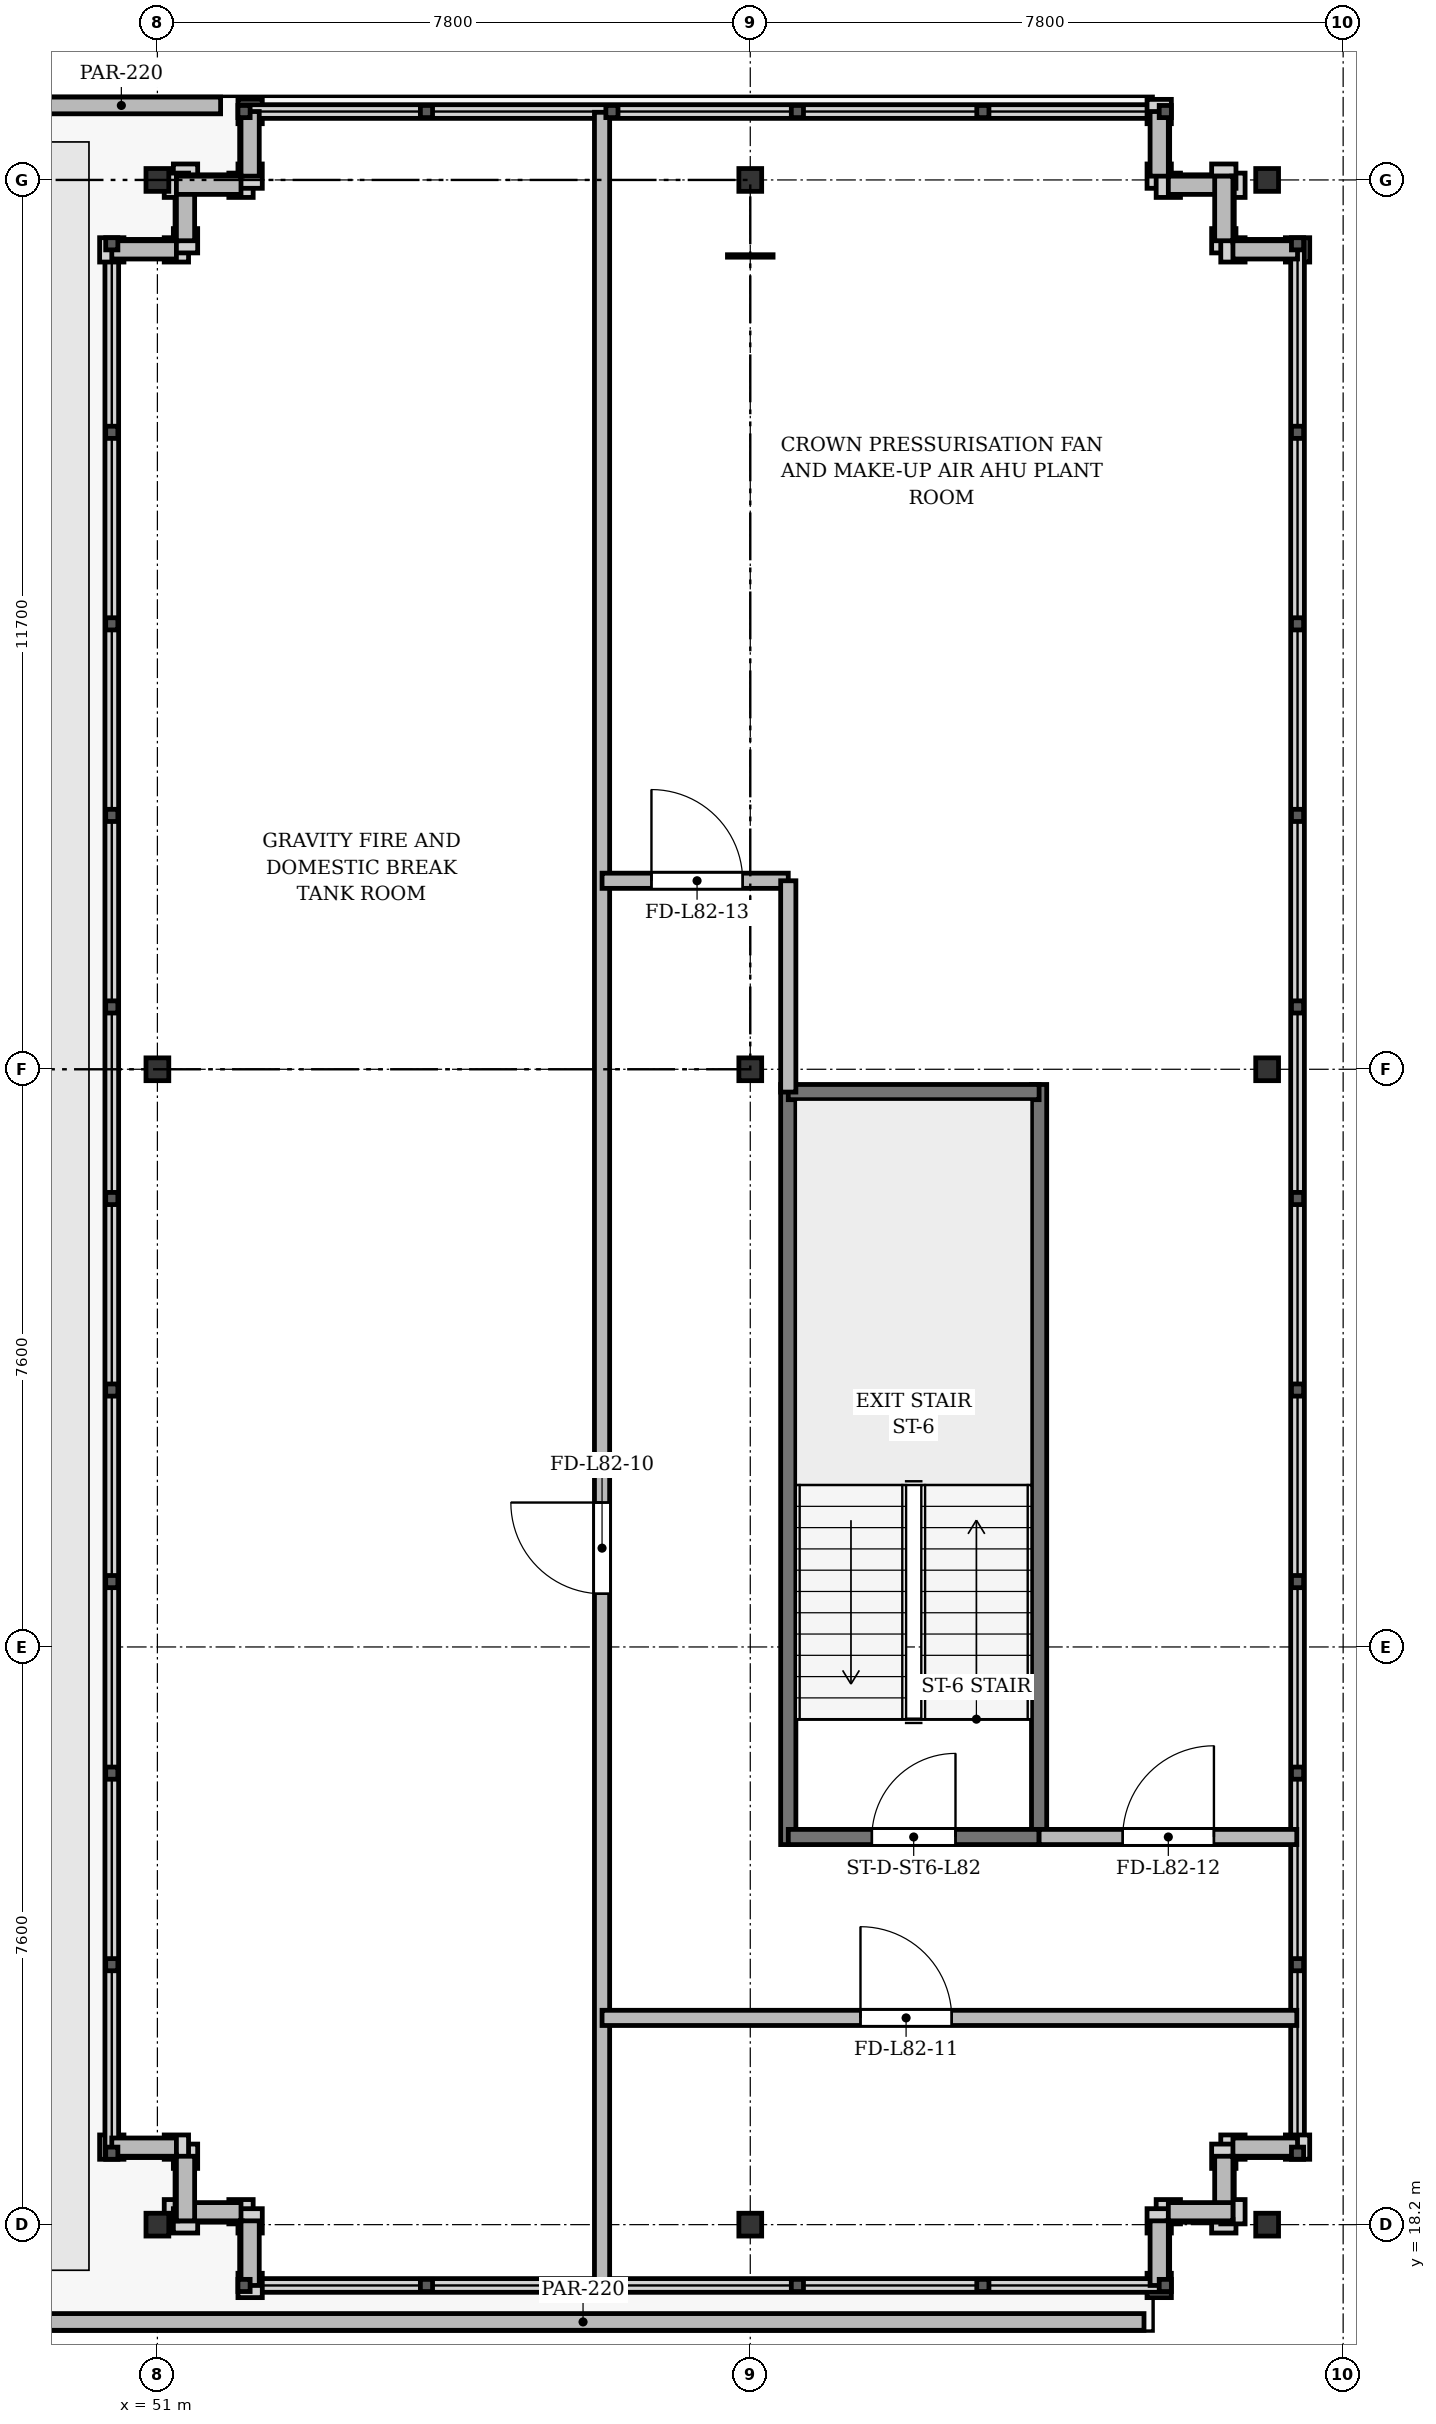
"""IFC4 building model, lengths in metres.
Left out: names, types, materials, properties, quantities, classifications, styles, units other than length and angle.
Written with IfcOpenShell. Run it as: python <this file> out.ifc"""

import sys

from ifc_helpers import new_model, si_unit, direction, frame, frame_2d, origin, origin_2d, place, context, subcontext, project, spatial, rectangle, i_section, extrude, source, transform, mapped, element, fill, save


model = new_model("IFC4")
c1 = context("Model", 3, precision=1e-05, world=origin(), true_north=direction((0.0, 1.0)))
c2 = subcontext(c1, "Body", "Model", "MODEL_VIEW")
j1 = project(units=[si_unit("LENGTHUNIT", "METRE"), si_unit("PLANEANGLEUNIT", "RADIAN")], contexts=[c1])
p1 = place(None, origin())
s1 = spatial("IfcSite", under=j1, at=p1, CompositionType="ELEMENT")
p2 = place(p1, origin())
s2 = spatial("IfcBuilding", under=s1, at=p2, CompositionType="ELEMENT")
p3 = place(p2, frame((0.0, 0.0, 316.7)))
s3 = spatial("IfcBuildingStorey", under=s2, at=p3, CompositionType="ELEMENT", Elevation=316.7)
m1 = source(origin(), c2, "Body", "SweptSolid", [
    extrude(i_section(OverallWidth=0.3, OverallDepth=0.3, WebThickness=0.015, FlangeThickness=0.024, at=origin_2d()), origin(), (0.0, 0.0, 1.0), 4.2),
])
for number, where, z_axis, x_axis in (
    (1, (51.0, 18.2, 0.0), (0.0, 0.0, 1.0), (1.0, 0.0, 0.0)),
    (2, (51.0, 33.4, 0.0), (0.0, 0.0, 1.0), (1.0, 0.0, 0.0)),
    (3, (51.0, 45.1, 0.0), (0.0, 0.0, 1.0), (1.0, 0.0, 0.0)),
    (4, (58.8, 18.2, 0.0), (0.0, 0.0, 1.0), (1.0, 0.0, 0.0)),
    (5, (58.8, 33.4, 0.0), (0.0, 0.0, 1.0), (1.0, 0.0, 0.0)),
    (6, (58.8, 45.1, 0.0), (0.0, 0.0, 1.0), (1.0, 0.0, 0.0)),
    (7, (65.6, 18.2, 0.0), (0.0, 0.0, 1.0), (1.0, 0.0, 0.0)),
    (8, (65.6, 33.4, 0.0), (0.0, 0.0, 1.0), (1.0, 0.0, 0.0)),
    (9, (65.6, 45.1, 0.0), (0.0, 0.0, 1.0), (1.0, 0.0, 0.0)),
):
    element("IfcColumn", number, at=place(p3, frame(where, z_axis=z_axis, x_axis=x_axis)), inside=s3, PredefinedType="COLUMN", context=c2, shape_type="MappedRepresentation", body=[
        mapped(m1, transform((0.0, 0.0, 0.0), x_axis=(1.0, 0.0, 0.0), y_axis=(0.0, 1.0, 0.0), z_axis=(0.0, 0.0, 1.0), scale=1.0)),
    ])
for number, where, z_axis, x_axis in (
    (10, (52.1, 18.37, 0.0), (0.0, 0.0, 1.0), (-1.0, 0.0, 0.0)),
    (11, (51.37, 18.25, 0.0), (0.0, 0.0, 1.0), (0.0, 1.0, 0.0)),
    (12, (51.25, 19.22, 0.0), (0.0, 0.0, 1.0), (-1.0, 0.0, 0.0)),
    (13, (50.4, 44.18, 0.0), (0.0, 0.0, 1.0), (1.0, 0.0, 0.0)),
):
    element("IfcWall", number, at=place(p3, frame(where, z_axis=z_axis, x_axis=x_axis)), inside=s3, PredefinedType="SOLIDWALL", context=c2, shape_type="SweptSolid", body=[
        extrude(rectangle(XDim=0.85, YDim=0.24, at=frame_2d((0.425, 0.0))), origin(), (0.0, 0.0, 1.0), 3.41),
    ])
p4 = place(p3, frame((51.37, 44.3, 0.0), z_axis=(0.0, 0.0, 1.0), x_axis=(0.0, 1.0, 0.0)))
e14 = element("IfcWall", 14, at=p4, inside=s3, PredefinedType="SOLIDWALL", context=c2, shape_type="SweptSolid", body=[
    extrude(rectangle(XDim=0.85, YDim=0.24, at=frame_2d((0.425, 0.0))), origin(), (0.0, 0.0, 1.0), 3.41),
])
for number, where, z_axis, x_axis in (
    (15, (51.25, 45.03, 0.0), (0.0, 0.0, 1.0), (1.0, 0.0, 0.0)),
    (16, (52.22, 45.15, 0.0), (0.0, 0.0, 1.0), (0.0, 1.0, 0.0)),
    (17, (64.18, 46.0, 0.0), (0.0, 0.0, 1.0), (0.0, -1.0, 0.0)),
):
    element("IfcWall", number, at=place(p3, frame(where, z_axis=z_axis, x_axis=x_axis)), inside=s3, PredefinedType="SOLIDWALL", context=c2, shape_type="SweptSolid", body=[
        extrude(rectangle(XDim=0.85, YDim=0.24, at=frame_2d((0.425, 0.0))), origin(), (0.0, 0.0, 1.0), 3.41),
    ])
for number, where, z_axis, x_axis in (
    (18, (64.3, 45.03, 0.0), (0.0, 0.0, 1.0), (1.0, 0.0, 0.0)),
    (19, (65.03, 45.15, 0.0), (0.0, 0.0, 1.0), (0.0, -1.0, 0.0)),
):
    element("IfcWall", number, at=place(p3, frame(where, z_axis=z_axis, x_axis=x_axis)), inside=s3, PredefinedType="SOLIDWALL", context=c2, shape_type="SweptSolid", body=[
        extrude(rectangle(XDim=0.85, YDim=0.24, at=frame_2d((0.425, 0.0))), origin(), (0.0, 0.0, 1.0), 3.41),
    ])
for number, where, z_axis, x_axis in (
    (20, (65.15, 44.18, 0.0), (0.0, 0.0, 1.0), (1.0, 0.0, 0.0)),
    (21, (66.0, 19.22, 0.0), (0.0, 0.0, 1.0), (-1.0, 0.0, 0.0)),
    (22, (65.03, 19.1, 0.0), (0.0, 0.0, 1.0), (0.0, -1.0, 0.0)),
):
    element("IfcWall", number, at=place(p3, frame(where, z_axis=z_axis, x_axis=x_axis)), inside=s3, PredefinedType="SOLIDWALL", context=c2, shape_type="SweptSolid", body=[
        extrude(rectangle(XDim=0.85, YDim=0.24, at=frame_2d((0.425, 0.0))), origin(), (0.0, 0.0, 1.0), 3.41),
    ])
p5 = place(p3, frame((65.15, 18.37, 0.0), z_axis=(0.0, 0.0, 1.0), x_axis=(-1.0, 0.0, 0.0)))
e23 = element("IfcWall", 23, at=p5, inside=s3, PredefinedType="SOLIDWALL", context=c2, shape_type="SweptSolid", body=[
    extrude(rectangle(XDim=0.85, YDim=0.24, at=frame_2d((0.425, 0.0))), origin(), (0.0, 0.0, 1.0), 3.41),
])
for number, where, z_axis, x_axis in (
    (24, (64.18, 18.25, 0.0), (0.0, 0.0, 1.0), (0.0, -1.0, 0.0)),
    (25, (52.22, 17.4, 0.0), (0.0, 0.0, 1.0), (0.0, 1.0, 0.0)),
):
    element("IfcWall", number, at=place(p3, frame(where, z_axis=z_axis, x_axis=x_axis)), inside=s3, PredefinedType="SOLIDWALL", context=c2, shape_type="SweptSolid", body=[
        extrude(rectangle(XDim=0.85, YDim=0.24, at=frame_2d((0.425, 0.0))), origin(), (0.0, 0.0, 1.0), 3.41),
    ])
p6 = place(p3, frame((49.22, 46.08, 0.0), z_axis=(0.0, 0.0, 1.0), x_axis=(1.0, 0.0, 0.0)))
e26 = element("IfcWall", 26, at=p6, inside=s3, PredefinedType="PARAPET", context=c2, shape_type="SweptSolid", body=[
    extrude(rectangle(XDim=2.612, YDim=0.22, at=frame_2d((1.306, 0.0))), origin(), (0.0, 0.0, 1.0), 1.08),
])
p7 = place(p3, frame((63.98, 16.92, 0.0), z_axis=(0.0, 0.0, 1.0), x_axis=(-1.0, 0.0, 0.0)))
e27 = element("IfcWall", 27, at=p7, inside=s3, PredefinedType="PARAPET", context=c2, shape_type="SweptSolid", body=[
    extrude(rectangle(XDim=14.76, YDim=0.22, at=frame_2d((7.38, 0.0))), origin(), (0.0, 0.0, 1.0), 1.08),
])
for number, where, z_axis, x_axis in (
    (28, (59.3, 23.2, 0.0), (0.0, 0.0, 1.0), (0.0, 1.0, 0.0)),
    (29, (62.6, 23.2, 0.0), (0.0, 0.0, 1.0), (0.0, 1.0, 0.0)),
):
    element("IfcWall", number, at=place(p3, frame(where, z_axis=z_axis, x_axis=x_axis)), inside=s3, PredefinedType="SHEAR", context=c2, shape_type="SweptSolid", body=[
        extrude(rectangle(XDim=10.0, YDim=0.2, at=frame_2d((5.0, 0.0))), origin(), (0.0, 0.0, 1.0), 3.91),
    ])
p8 = place(p3, frame((59.3, 33.1, 0.0), z_axis=(0.0, 0.0, 1.0), x_axis=(1.0, 0.0, 0.0)))
e30 = element("IfcWall", 30, at=p8, inside=s3, PredefinedType="SHEAR", context=c2, shape_type="SweptSolid", body=[
    extrude(rectangle(XDim=3.3, YDim=0.2, at=frame_2d((1.65, 0.0))), origin(), (0.0, 0.0, 1.0), 3.91),
])
p9 = place(p3, frame((59.3, 23.3, 0.0), z_axis=(0.0, 0.0, 1.0), x_axis=(1.0, 0.0, 0.0)))
e31 = element("IfcWall", 31, at=p9, inside=s3, PredefinedType="SHEAR", context=c2, shape_type="SweptSolid", body=[
    extrude(rectangle(XDim=3.3, YDim=0.2, at=frame_2d((1.65, 0.0))), origin(), (0.0, 0.0, 1.0), 3.91),
])
p10 = place(p9, frame((1.1, 0.0, 0.0)))
e32 = element("IfcOpeningElement", 32, at=p10, cuts=e31, PredefinedType="OPENING", context=c2, shape_type="SweptSolid", body=[
    extrude(rectangle(XDim=1.1, YDim=2.15, at=frame_2d((0.55, 1.075))), frame((0.0, 0.11, 0.0), z_axis=(0.0, -1.0, 0.0), x_axis=(1.0, 0.0, 0.0)), (0.0, 0.0, 1.0), 0.22),
])
p11 = place(p3, frame((56.85, 17.41, 0.0), z_axis=(0.0, 0.0, 1.0), x_axis=(0.0, 1.0, 0.0)))
e33 = element("IfcWall", 33, at=p11, inside=s3, PredefinedType="PARTITIONING", context=c2, shape_type="SweptSolid", body=[
    extrude(rectangle(XDim=28.58, YDim=0.2, at=frame_2d((14.29, 0.0))), origin(), (0.0, 0.0, 1.0), 3.41),
])
p12 = place(p11, frame((9.09, 0.0, 0.0)))
e34 = element("IfcOpeningElement", 34, at=p12, cuts=e33, PredefinedType="OPENING", context=c2, shape_type="SweptSolid", body=[
    extrude(rectangle(XDim=1.2, YDim=2.15, at=frame_2d((0.6, 1.075))), frame((0.0, 0.11, 0.0), z_axis=(0.0, -1.0, 0.0), x_axis=(1.0, 0.0, 0.0)), (0.0, 0.0, 1.0), 0.22),
])
p13 = place(p3, frame((56.85, 20.92, 0.0), z_axis=(0.0, 0.0, 1.0), x_axis=(1.0, 0.0, 0.0)))
e35 = element("IfcWall", 35, at=p13, inside=s3, PredefinedType="PARTITIONING", context=c2, shape_type="SweptSolid", body=[
    extrude(rectangle(XDim=9.14, YDim=0.2, at=frame_2d((4.57, 0.0))), origin(), (0.0, 0.0, 1.0), 3.41),
])
p14 = place(p13, frame((3.4, 0.0, 0.0)))
e36 = element("IfcOpeningElement", 36, at=p14, cuts=e35, PredefinedType="OPENING", context=c2, shape_type="SweptSolid", body=[
    extrude(rectangle(XDim=1.2, YDim=2.15, at=frame_2d((0.6, 1.075))), frame((0.0, 0.11, 0.0), z_axis=(0.0, -1.0, 0.0), x_axis=(1.0, 0.0, 0.0)), (0.0, 0.0, 1.0), 0.22),
])
p15 = place(p3, frame((62.6, 23.3, 0.0), z_axis=(0.0, 0.0, 1.0), x_axis=(1.0, 0.0, 0.0)))
e37 = element("IfcWall", 37, at=p15, inside=s3, PredefinedType="PARTITIONING", context=c2, shape_type="SweptSolid", body=[
    extrude(rectangle(XDim=3.39, YDim=0.2, at=frame_2d((1.695, 0.0))), origin(), (0.0, 0.0, 1.0), 3.41),
])
p16 = place(p15, frame((1.1, 0.0, 0.0)))
e38 = element("IfcOpeningElement", 38, at=p16, cuts=e37, PredefinedType="OPENING", context=c2, shape_type="SweptSolid", body=[
    extrude(rectangle(XDim=1.2, YDim=2.15, at=frame_2d((0.6, 1.075))), frame((0.0, 0.11, 0.0), z_axis=(0.0, -1.0, 0.0), x_axis=(1.0, 0.0, 0.0)), (0.0, 0.0, 1.0), 0.22),
])
p17 = place(p3, frame((56.85, 35.88, 0.0), z_axis=(0.0, 0.0, 1.0), x_axis=(1.0, 0.0, 0.0)))
e39 = element("IfcWall", 39, at=p17, inside=s3, PredefinedType="PARTITIONING", context=c2, shape_type="SweptSolid", body=[
    extrude(rectangle(XDim=2.45, YDim=0.2, at=frame_2d((1.225, 0.0))), origin(), (0.0, 0.0, 1.0), 3.41),
])
p18 = place(p17, frame((0.65, 0.0, 0.0)))
e40 = element("IfcOpeningElement", 40, at=p18, cuts=e39, PredefinedType="OPENING", context=c2, shape_type="SweptSolid", body=[
    extrude(rectangle(XDim=1.2, YDim=2.15, at=frame_2d((0.6, 1.075))), frame((0.0, 0.11, 0.0), z_axis=(0.0, -1.0, 0.0), x_axis=(1.0, 0.0, 0.0)), (0.0, 0.0, 1.0), 0.22),
])
p19 = place(p3, frame((59.3, 33.1, 0.0), z_axis=(0.0, 0.0, 1.0), x_axis=(0.0, 1.0, 0.0)))
e41 = element("IfcWall", 41, at=p19, inside=s3, PredefinedType="PARTITIONING", context=c2, shape_type="SweptSolid", body=[
    extrude(rectangle(XDim=2.78, YDim=0.2, at=frame_2d((1.39, 0.0))), origin(), (0.0, 0.0, 1.0), 3.41),
])
m2 = source(origin(), c2, "Body", "SweptSolid", [
    extrude(rectangle(XDim=1.1, YDim=2.15, at=frame_2d((0.55, 1.075))), frame((0.0, 0.025, 0.0), z_axis=(0.0, -1.0, 0.0), x_axis=(1.0, 0.0, 0.0)), (0.0, 0.0, 1.0), 0.05),
])
p20 = place(p10, origin())
e42 = element("IfcDoor", 42, at=p20, inside=s3, OperationType="SINGLE_SWING_RIGHT", PredefinedType="DOOR", context=c2, shape_type="MappedRepresentation", body=[
    mapped(m2, transform((0.0, 0.0, 0.0), x_axis=(1.0, 0.0, 0.0), y_axis=(0.0, 1.0, 0.0), z_axis=(0.0, 0.0, 1.0), scale=1.0)),
])
fill(e32, e42)
m3 = source(origin(), c2, "Body", "SweptSolid", [
    extrude(rectangle(XDim=1.2, YDim=2.15, at=frame_2d((0.6, 1.075))), frame((0.0, 0.025, 0.0), z_axis=(0.0, -1.0, 0.0), x_axis=(1.0, 0.0, 0.0)), (0.0, 0.0, 1.0), 0.05),
])
p21 = place(p12, origin())
e43 = element("IfcDoor", 43, at=p21, inside=s3, OperationType="SINGLE_SWING_RIGHT", PredefinedType="DOOR", context=c2, shape_type="MappedRepresentation", body=[
    mapped(m3, transform((0.0, 0.0, 0.0), x_axis=(1.0, 0.0, 0.0), y_axis=(0.0, 1.0, 0.0), z_axis=(0.0, 0.0, 1.0), scale=1.0)),
])
fill(e34, e43)
p22 = place(p14, origin())
e44 = element("IfcDoor", 44, at=p22, inside=s3, OperationType="SINGLE_SWING_LEFT", PredefinedType="DOOR", context=c2, shape_type="MappedRepresentation", body=[
    mapped(m3, transform((0.0, 0.0, 0.0), x_axis=(1.0, 0.0, 0.0), y_axis=(0.0, 1.0, 0.0), z_axis=(0.0, 0.0, 1.0), scale=1.0)),
])
fill(e36, e44)
p23 = place(p16, origin())
e45 = element("IfcDoor", 45, at=p23, inside=s3, OperationType="SINGLE_SWING_RIGHT", PredefinedType="DOOR", context=c2, shape_type="MappedRepresentation", body=[
    mapped(m3, transform((0.0, 0.0, 0.0), x_axis=(1.0, 0.0, 0.0), y_axis=(0.0, 1.0, 0.0), z_axis=(0.0, 0.0, 1.0), scale=1.0)),
])
fill(e38, e45)
p24 = place(p18, origin())
e46 = element("IfcDoor", 46, at=p24, inside=s3, OperationType="SINGLE_SWING_LEFT", PredefinedType="DOOR", context=c2, shape_type="MappedRepresentation", body=[
    mapped(m3, transform((0.0, 0.0, 0.0), x_axis=(1.0, 0.0, 0.0), y_axis=(0.0, 1.0, 0.0), z_axis=(0.0, 0.0, 1.0), scale=1.0)),
])
fill(e40, e46)
save(model, sys.argv[1])
